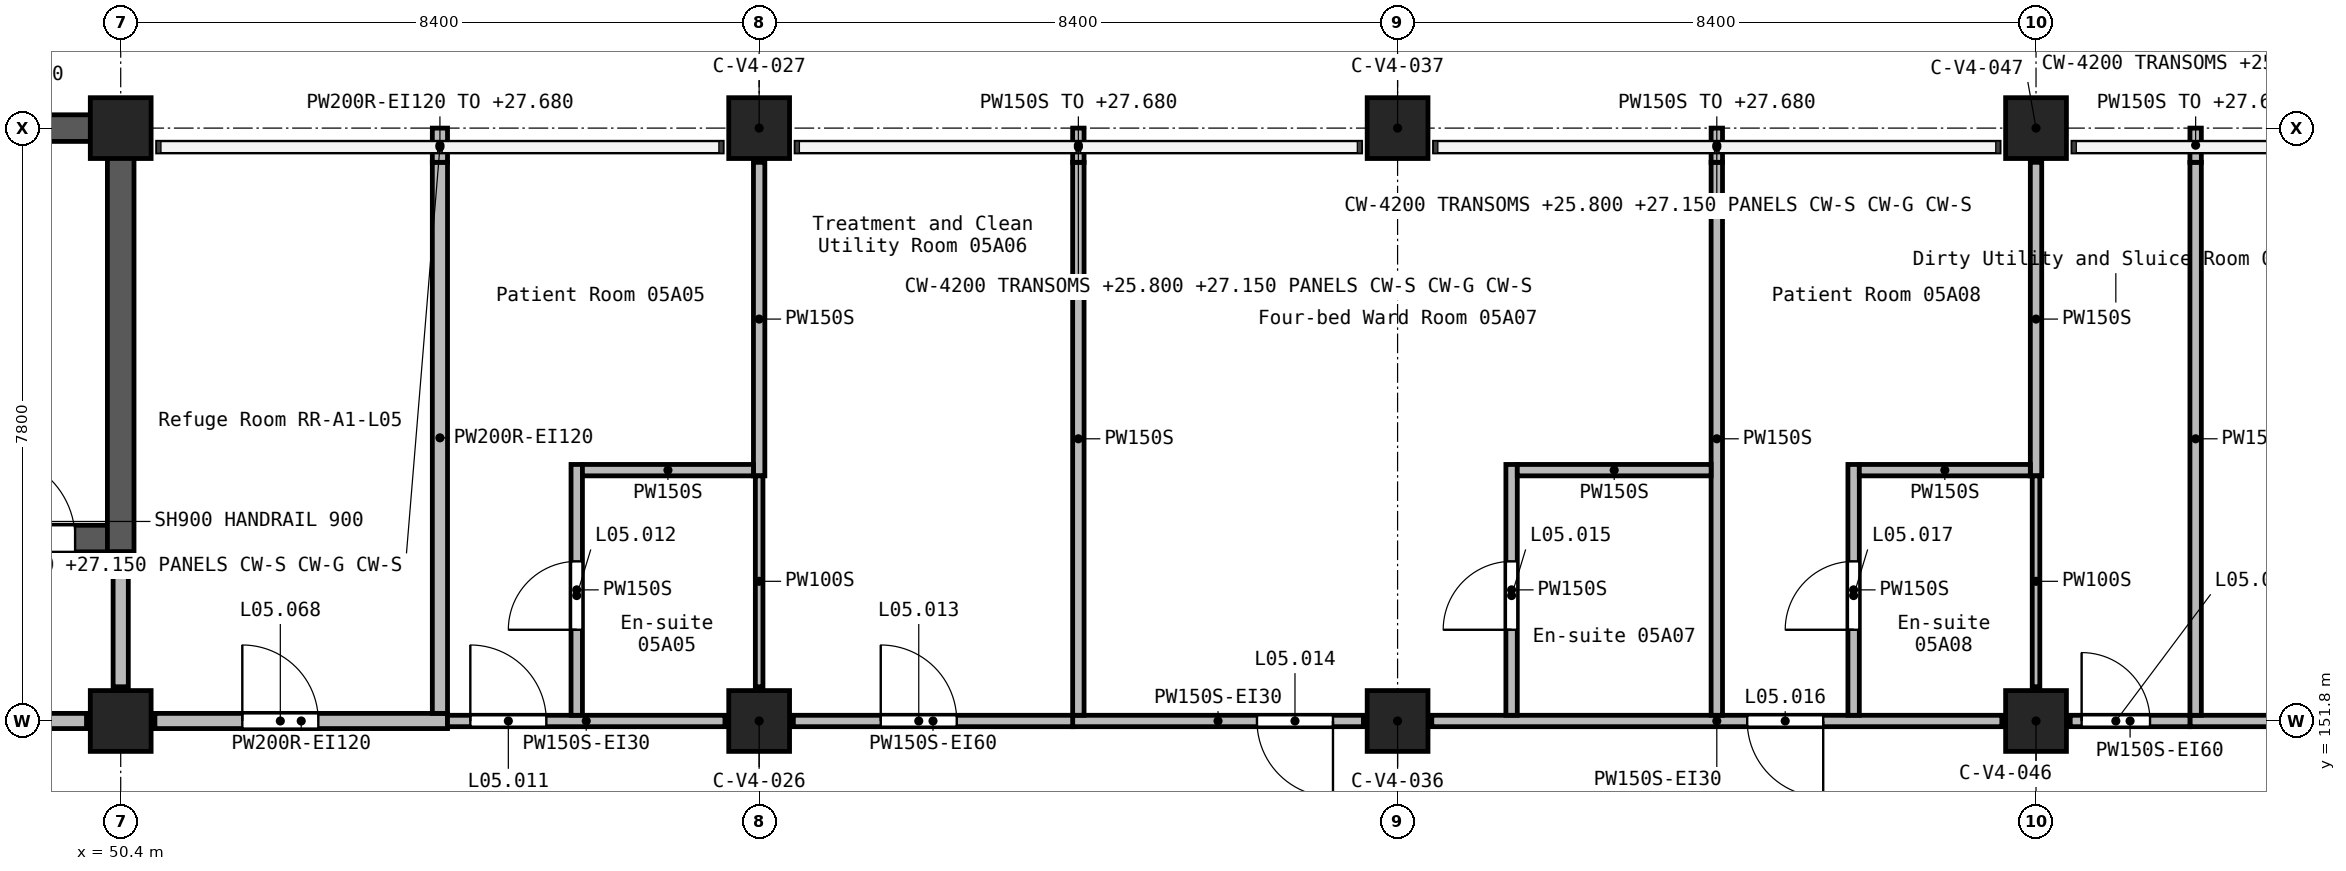
"""IFC4 building model, lengths in metres.
Left out: names, types, materials, properties, quantities, classifications, styles, units other than length and angle.
Written with IfcOpenShell. Run it as: python <this file> out.ifc"""

import sys

from ifc_helpers import new_model, si_unit, direction, frame, frame_2d, origin, origin_2d, place, context, subcontext, project, spatial, rectangle, extrude, element, fill, save


model = new_model("IFC4")
c1 = context("Model", 3, precision=1e-05, world=origin(), true_north=direction((0.0, 1.0)))
c2 = subcontext(c1, "Body", "Model", "MODEL_VIEW")
j1 = project(units=[si_unit("LENGTHUNIT", "METRE"), si_unit("PLANEANGLEUNIT", "RADIAN")], contexts=[c1])
p1 = place(None, origin())
s1 = spatial("IfcSite", under=j1, at=p1, CompositionType="ELEMENT")
p2 = place(p1, origin())
s2 = spatial("IfcBuilding", under=s1, at=p2, CompositionType="ELEMENT")
p3 = place(p2, frame((0.0, 0.0, 24.9)))
s3 = spatial("IfcBuildingStorey", under=s2, at=p3, CompositionType="ELEMENT", Elevation=24.9)
for number, where, z_axis, x_axis in (
    (1, (50.4, 151.8, 0.0), (0.0, 0.0, 1.0), (1.0, 0.0, 0.0)),
    (2, (50.4, 159.6, 0.0), (0.0, 0.0, 1.0), (1.0, 0.0, 0.0)),
    (3, (58.8, 151.8, 0.0), (0.0, 0.0, 1.0), (1.0, 0.0, 0.0)),
    (4, (58.8, 159.6, 0.0), (0.0, 0.0, 1.0), (1.0, 0.0, 0.0)),
    (5, (67.2, 151.8, 0.0), (0.0, 0.0, 1.0), (1.0, 0.0, 0.0)),
    (6, (67.2, 159.6, 0.0), (0.0, 0.0, 1.0), (1.0, 0.0, 0.0)),
    (7, (75.6, 151.8, 0.0), (0.0, 0.0, 1.0), (1.0, 0.0, 0.0)),
    (8, (75.6, 159.6, 0.0), (0.0, 0.0, 1.0), (1.0, 0.0, 0.0)),
):
    element("IfcColumn", number, at=place(p3, frame(where, z_axis=z_axis, x_axis=x_axis)), inside=s3, PredefinedType="COLUMN", context=c2, shape_type="SweptSolid", body=[
        extrude(rectangle(XDim=0.8, YDim=0.8, at=origin_2d()), origin(), (0.0, 0.0, 1.0), 3.9),
    ])
p4 = place(p3, frame((41.825, 159.6, 0.0), z_axis=(0.0, 0.0, 1.0), x_axis=(1.0, 0.0, 0.0)))
e9 = element("IfcWall", 9, at=p4, inside=s3, PredefinedType="SHEAR", context=c2, shape_type="SweptSolid", body=[
    extrude(rectangle(XDim=8.4, YDim=0.35, at=frame_2d((4.2, 0.0))), origin(), (0.0, 0.0, 1.0), 3.9),
])
p5 = place(p3, frame((42.175, 154.2, 0.0), z_axis=(0.0, 0.0, 1.0), x_axis=(1.0, 0.0, 0.0)))
e10 = element("IfcWall", 10, at=p5, inside=s3, PredefinedType="SHEAR", context=c2, shape_type="SweptSolid", body=[
    extrude(rectangle(XDim=8.05, YDim=0.35, at=frame_2d((4.025, 0.0))), origin(), (0.0, 0.0, 1.0), 3.9),
])
p6 = place(p5, frame((6.525, 0.0, 0.0)))
e11 = element("IfcOpeningElement", 11, at=p6, cuts=e10, PredefinedType="OPENING", context=c2, shape_type="SweptSolid", body=[
    extrude(rectangle(XDim=1.1, YDim=2.1, at=frame_2d((0.55, 1.05))), frame((0.0, 0.185, 0.0), z_axis=(0.0, -1.0, 0.0), x_axis=(1.0, 0.0, 0.0)), (0.0, 0.0, 1.0), 0.37),
])
p7 = place(p3, frame((50.4, 154.025, 0.0), z_axis=(0.0, 0.0, 1.0), x_axis=(0.0, 1.0, 0.0)))
e12 = element("IfcWall", 12, at=p7, inside=s3, PredefinedType="SHEAR", context=c2, shape_type="SweptSolid", body=[
    extrude(rectangle(XDim=5.75, YDim=0.35, at=frame_2d((2.875, 0.0))), origin(), (0.0, 0.0, 1.0), 3.9),
])
p8 = place(p3, frame((42.45, 151.8, 0.0), z_axis=(0.0, 0.0, 1.0), x_axis=(1.0, 0.0, 0.0)))
e13 = element("IfcWall", 13, at=p8, inside=s3, PredefinedType="SOLIDWALL", context=c2, shape_type="SweptSolid", body=[
    extrude(rectangle(XDim=7.5, YDim=0.2, at=frame_2d((3.75, 0.0))), origin(), (0.0, 0.0, 1.0), 3.6),
])
p9 = place(p8, frame((3.2, 0.0, 0.0)))
e14 = element("IfcOpeningElement", 14, at=p9, cuts=e13, PredefinedType="OPENING", context=c2, shape_type="SweptSolid", body=[
    extrude(rectangle(XDim=1.1, YDim=2.1, at=frame_2d((0.55, 1.05))), frame((0.0, 0.11, 0.0), z_axis=(0.0, -1.0, 0.0), x_axis=(1.0, 0.0, 0.0)), (0.0, 0.0, 1.0), 0.22),
])
p10 = place(p3, frame((50.85, 151.8, 0.0), z_axis=(0.0, 0.0, 1.0), x_axis=(1.0, 0.0, 0.0)))
e15 = element("IfcWall", 15, at=p10, inside=s3, PredefinedType="SOLIDWALL", context=c2, shape_type="SweptSolid", body=[
    extrude(rectangle(XDim=3.85, YDim=0.2, at=frame_2d((1.925, 0.0))), origin(), (0.0, 0.0, 1.0), 3.6),
])
p11 = place(p10, frame((1.15, 0.0, 0.0)))
e16 = element("IfcOpeningElement", 16, at=p11, cuts=e15, PredefinedType="OPENING", context=c2, shape_type="SweptSolid", body=[
    extrude(rectangle(XDim=1.0, YDim=2.1, at=frame_2d((0.5, 1.05))), frame((0.0, 0.11, 0.0), z_axis=(0.0, -1.0, 0.0), x_axis=(1.0, 0.0, 0.0)), (0.0, 0.0, 1.0), 0.22),
])
p12 = place(p3, frame((50.4, 152.25, 0.0), z_axis=(0.0, 0.0, 1.0), x_axis=(0.0, 1.0, 0.0)))
e17 = element("IfcWall", 17, at=p12, inside=s3, PredefinedType="SOLIDWALL", context=c2, shape_type="SweptSolid", body=[
    extrude(rectangle(XDim=1.775, YDim=0.2, at=frame_2d((0.887, 0.0))), origin(), (0.0, 0.0, 1.0), 3.6),
])
p13 = place(p3, frame((54.6, 151.9, 0.0), z_axis=(0.0, 0.0, 1.0), x_axis=(0.0, 1.0, 0.0)))
e18 = element("IfcWall", 18, at=p13, inside=s3, PredefinedType="SOLIDWALL", context=c2, shape_type="SweptSolid", body=[
    extrude(rectangle(XDim=7.25, YDim=0.2, at=frame_2d((3.625, 0.0))), origin(), (0.0, 0.0, 1.0), 3.6),
])
p14 = place(p3, frame((54.6, 159.15, 0.0), z_axis=(0.0, 0.0, 1.0), x_axis=(0.0, 1.0, 0.0)))
e19 = element("IfcWall", 19, at=p14, inside=s3, PredefinedType="SOLIDWALL", context=c2, shape_type="SweptSolid", body=[
    extrude(rectangle(XDim=0.45, YDim=0.2, at=frame_2d((0.225, 0.0))), origin(), (0.0, 0.0, 1.0), 2.78),
])
p15 = place(p3, frame((75.15, 151.8, 0.0), z_axis=(0.0, 0.0, 1.0), x_axis=(-1.0, 0.0, 0.0)))
e20 = element("IfcWall", 20, at=p15, inside=s3, PredefinedType="PARTITIONING", context=c2, shape_type="SweptSolid", body=[
    extrude(rectangle(XDim=7.5, YDim=0.15, at=frame_2d((3.75, 0.0))), origin(), (0.0, 0.0, 1.0), 3.6),
])
p16 = place(p15, frame((2.35, 0.0, 0.0)))
e21 = element("IfcOpeningElement", 21, at=p16, cuts=e20, PredefinedType="OPENING", context=c2, shape_type="SweptSolid", body=[
    extrude(rectangle(XDim=1.0, YDim=2.1, at=frame_2d((0.5, 1.05))), frame((0.0, 0.085, 0.0), z_axis=(0.0, -1.0, 0.0), x_axis=(1.0, 0.0, 0.0)), (0.0, 0.0, 1.0), 0.17),
])
p17 = place(p3, frame((66.75, 151.8, 0.0), z_axis=(0.0, 0.0, 1.0), x_axis=(-1.0, 0.0, 0.0)))
e22 = element("IfcWall", 22, at=p17, inside=s3, PredefinedType="PARTITIONING", context=c2, shape_type="SweptSolid", body=[
    extrude(rectangle(XDim=3.825, YDim=0.15, at=frame_2d((1.913, 0.0))), origin(), (0.0, 0.0, 1.0), 3.6),
])
p18 = place(p17, frame((0.4, 0.0, 0.0)))
e23 = element("IfcOpeningElement", 23, at=p18, cuts=e22, PredefinedType="OPENING", context=c2, shape_type="SweptSolid", body=[
    extrude(rectangle(XDim=1.0, YDim=2.1, at=frame_2d((0.5, 1.05))), frame((0.0, 0.085, 0.0), z_axis=(0.0, -1.0, 0.0), x_axis=(1.0, 0.0, 0.0)), (0.0, 0.0, 1.0), 0.17),
])
p19 = place(p3, frame((77.625, 151.8, 0.0), z_axis=(0.0, 0.0, 1.0), x_axis=(1.0, 0.0, 0.0)))
e24 = element("IfcWall", 24, at=p19, inside=s3, PredefinedType="PARTITIONING", context=c2, shape_type="SweptSolid", body=[
    extrude(rectangle(XDim=5.925, YDim=0.15, at=frame_2d((2.962, 0.0))), origin(), (0.0, 0.0, 1.0), 3.6),
])
p20 = place(p19, frame((1.375, 0.0, 0.0)))
e25 = element("IfcOpeningElement", 25, at=p20, cuts=e24, PredefinedType="OPENING", context=c2, shape_type="SweptSolid", body=[
    extrude(rectangle(XDim=1.0, YDim=2.1, at=frame_2d((0.5, 1.05))), frame((0.0, 0.085, 0.0), z_axis=(0.0, -1.0, 0.0), x_axis=(1.0, 0.0, 0.0)), (0.0, 0.0, 1.0), 0.17),
])
p21 = place(p3, frame((59.25, 151.8, 0.0), z_axis=(0.0, 0.0, 1.0), x_axis=(1.0, 0.0, 0.0)))
e26 = element("IfcWall", 26, at=p21, inside=s3, PredefinedType="PARTITIONING", context=c2, shape_type="SweptSolid", body=[
    extrude(rectangle(XDim=3.675, YDim=0.15, at=frame_2d((1.837, 0.0))), origin(), (0.0, 0.0, 1.0), 3.6),
])
p22 = place(p21, frame((1.15, 0.0, 0.0)))
e27 = element("IfcOpeningElement", 27, at=p22, cuts=e26, PredefinedType="OPENING", context=c2, shape_type="SweptSolid", body=[
    extrude(rectangle(XDim=1.0, YDim=2.1, at=frame_2d((0.5, 1.05))), frame((0.0, 0.085, 0.0), z_axis=(0.0, -1.0, 0.0), x_axis=(1.0, 0.0, 0.0)), (0.0, 0.0, 1.0), 0.17),
])
p23 = place(p3, frame((54.7, 151.8, 0.0), z_axis=(0.0, 0.0, 1.0), x_axis=(1.0, 0.0, 0.0)))
e28 = element("IfcWall", 28, at=p23, inside=s3, PredefinedType="PARTITIONING", context=c2, shape_type="SweptSolid", body=[
    extrude(rectangle(XDim=3.65, YDim=0.15, at=frame_2d((1.825, 0.0))), origin(), (0.0, 0.0, 1.0), 3.6),
])
p24 = place(p23, frame((0.3, 0.0, 0.0)))
e29 = element("IfcOpeningElement", 29, at=p24, cuts=e28, PredefinedType="OPENING", context=c2, shape_type="SweptSolid", body=[
    extrude(rectangle(XDim=1.0, YDim=2.1, at=frame_2d((0.5, 1.05))), frame((0.0, 0.085, 0.0), z_axis=(0.0, -1.0, 0.0), x_axis=(1.0, 0.0, 0.0)), (0.0, 0.0, 1.0), 0.17),
])
p25 = place(p3, frame((76.05, 151.8, 0.0), z_axis=(0.0, 0.0, 1.0), x_axis=(1.0, 0.0, 0.0)))
e30 = element("IfcWall", 30, at=p25, inside=s3, PredefinedType="PARTITIONING", context=c2, shape_type="SweptSolid", body=[
    extrude(rectangle(XDim=1.575, YDim=0.15, at=frame_2d((0.788, 0.0))), origin(), (0.0, 0.0, 1.0), 3.6),
])
p26 = place(p25, frame((0.15, 0.0, 0.0)))
e31 = element("IfcOpeningElement", 31, at=p26, cuts=e30, PredefinedType="OPENING", context=c2, shape_type="SweptSolid", body=[
    extrude(rectangle(XDim=0.9, YDim=2.1, at=frame_2d((0.45, 1.05))), frame((0.0, 0.085, 0.0), z_axis=(0.0, -1.0, 0.0), x_axis=(1.0, 0.0, 0.0)), (0.0, 0.0, 1.0), 0.17),
])
p27 = place(p3, frame((63.0, 151.875, 0.0), z_axis=(0.0, 0.0, 1.0), x_axis=(0.0, 1.0, 0.0)))
e32 = element("IfcWall", 32, at=p27, inside=s3, PredefinedType="PARTITIONING", context=c2, shape_type="SweptSolid", body=[
    extrude(rectangle(XDim=7.275, YDim=0.15, at=frame_2d((3.637, 0.0))), origin(), (0.0, 0.0, 1.0), 3.6),
])
p28 = place(p3, frame((63.0, 159.15, 0.0), z_axis=(0.0, 0.0, 1.0), x_axis=(0.0, 1.0, 0.0)))
e33 = element("IfcWall", 33, at=p28, inside=s3, PredefinedType="PARTITIONING", context=c2, shape_type="SweptSolid", body=[
    extrude(rectangle(XDim=0.45, YDim=0.15, at=frame_2d((0.225, 0.0))), origin(), (0.0, 0.0, 1.0), 2.78),
])
p29 = place(p3, frame((71.4, 151.875, 0.0), z_axis=(0.0, 0.0, 1.0), x_axis=(0.0, 1.0, 0.0)))
e34 = element("IfcWall", 34, at=p29, inside=s3, PredefinedType="PARTITIONING", context=c2, shape_type="SweptSolid", body=[
    extrude(rectangle(XDim=7.275, YDim=0.15, at=frame_2d((3.637, 0.0))), origin(), (0.0, 0.0, 1.0), 3.6),
])
p30 = place(p3, frame((71.4, 159.15, 0.0), z_axis=(0.0, 0.0, 1.0), x_axis=(0.0, 1.0, 0.0)))
e35 = element("IfcWall", 35, at=p30, inside=s3, PredefinedType="PARTITIONING", context=c2, shape_type="SweptSolid", body=[
    extrude(rectangle(XDim=0.45, YDim=0.15, at=frame_2d((0.225, 0.0))), origin(), (0.0, 0.0, 1.0), 2.78),
])
p31 = place(p3, frame((77.7, 151.875, 0.0), z_axis=(0.0, 0.0, 1.0), x_axis=(0.0, 1.0, 0.0)))
e36 = element("IfcWall", 36, at=p31, inside=s3, PredefinedType="PARTITIONING", context=c2, shape_type="SweptSolid", body=[
    extrude(rectangle(XDim=7.275, YDim=0.15, at=frame_2d((3.637, 0.0))), origin(), (0.0, 0.0, 1.0), 3.6),
])
p32 = place(p3, frame((77.7, 159.15, 0.0), z_axis=(0.0, 0.0, 1.0), x_axis=(0.0, 1.0, 0.0)))
e37 = element("IfcWall", 37, at=p32, inside=s3, PredefinedType="PARTITIONING", context=c2, shape_type="SweptSolid", body=[
    extrude(rectangle(XDim=0.45, YDim=0.15, at=frame_2d((0.225, 0.0))), origin(), (0.0, 0.0, 1.0), 2.78),
])
for number, where, z_axis, x_axis in (
    (38, (58.8, 155.025, 0.0), (0.0, 0.0, 1.0), (0.0, 1.0, 0.0)),
    (39, (75.6, 155.025, 0.0), (0.0, 0.0, 1.0), (0.0, 1.0, 0.0)),
):
    element("IfcWall", number, at=place(p3, frame(where, z_axis=z_axis, x_axis=x_axis)), inside=s3, PredefinedType="PARTITIONING", context=c2, shape_type="SweptSolid", body=[
        extrude(rectangle(XDim=4.125, YDim=0.15, at=frame_2d((2.062, 0.0))), origin(), (0.0, 0.0, 1.0), 3.6),
    ])
p33 = place(p3, frame((56.4, 151.875, 0.0), z_axis=(0.0, 0.0, 1.0), x_axis=(0.0, 1.0, 0.0)))
e40 = element("IfcWall", 40, at=p33, inside=s3, PredefinedType="PARTITIONING", context=c2, shape_type="SweptSolid", body=[
    extrude(rectangle(XDim=3.3, YDim=0.15, at=frame_2d((1.65, 0.0))), origin(), (0.0, 0.0, 1.0), 3.6),
])
p34 = place(p33, frame((1.125, 0.0, 0.0)))
e41 = element("IfcOpeningElement", 41, at=p34, cuts=e40, PredefinedType="OPENING", context=c2, shape_type="SweptSolid", body=[
    extrude(rectangle(XDim=0.9, YDim=2.1, at=frame_2d((0.45, 1.05))), frame((0.0, 0.085, 0.0), z_axis=(0.0, -1.0, 0.0), x_axis=(1.0, 0.0, 0.0)), (0.0, 0.0, 1.0), 0.17),
])
p35 = place(p3, frame((68.7, 151.875, 0.0), z_axis=(0.0, 0.0, 1.0), x_axis=(0.0, 1.0, 0.0)))
e42 = element("IfcWall", 42, at=p35, inside=s3, PredefinedType="PARTITIONING", context=c2, shape_type="SweptSolid", body=[
    extrude(rectangle(XDim=3.3, YDim=0.15, at=frame_2d((1.65, 0.0))), origin(), (0.0, 0.0, 1.0), 3.6),
])
p36 = place(p35, frame((1.125, 0.0, 0.0)))
e43 = element("IfcOpeningElement", 43, at=p36, cuts=e42, PredefinedType="OPENING", context=c2, shape_type="SweptSolid", body=[
    extrude(rectangle(XDim=0.9, YDim=2.1, at=frame_2d((0.45, 1.05))), frame((0.0, 0.085, 0.0), z_axis=(0.0, -1.0, 0.0), x_axis=(1.0, 0.0, 0.0)), (0.0, 0.0, 1.0), 0.17),
])
p37 = place(p3, frame((73.2, 151.875, 0.0), z_axis=(0.0, 0.0, 1.0), x_axis=(0.0, 1.0, 0.0)))
e44 = element("IfcWall", 44, at=p37, inside=s3, PredefinedType="PARTITIONING", context=c2, shape_type="SweptSolid", body=[
    extrude(rectangle(XDim=3.3, YDim=0.15, at=frame_2d((1.65, 0.0))), origin(), (0.0, 0.0, 1.0), 3.6),
])
p38 = place(p37, frame((1.125, 0.0, 0.0)))
e45 = element("IfcOpeningElement", 45, at=p38, cuts=e44, PredefinedType="OPENING", context=c2, shape_type="SweptSolid", body=[
    extrude(rectangle(XDim=0.9, YDim=2.1, at=frame_2d((0.45, 1.05))), frame((0.0, 0.085, 0.0), z_axis=(0.0, -1.0, 0.0), x_axis=(1.0, 0.0, 0.0)), (0.0, 0.0, 1.0), 0.17),
])
p39 = place(p3, frame((68.775, 155.1, 0.0), z_axis=(0.0, 0.0, 1.0), x_axis=(1.0, 0.0, 0.0)))
e46 = element("IfcWall", 46, at=p39, inside=s3, PredefinedType="PARTITIONING", context=c2, shape_type="SweptSolid", body=[
    extrude(rectangle(XDim=2.55, YDim=0.15, at=frame_2d((1.275, 0.0))), origin(), (0.0, 0.0, 1.0), 3.6),
])
for number, where, z_axis, x_axis in (
    (47, (56.475, 155.1, 0.0), (0.0, 0.0, 1.0), (1.0, 0.0, 0.0)),
    (48, (73.275, 155.1, 0.0), (0.0, 0.0, 1.0), (1.0, 0.0, 0.0)),
):
    element("IfcWall", number, at=place(p3, frame(where, z_axis=z_axis, x_axis=x_axis)), inside=s3, PredefinedType="PARTITIONING", context=c2, shape_type="SweptSolid", body=[
        extrude(rectangle(XDim=2.25, YDim=0.15, at=frame_2d((1.125, 0.0))), origin(), (0.0, 0.0, 1.0), 3.6),
    ])
for number, where, z_axis, x_axis in (
    (49, (58.8, 152.25, 0.0), (0.0, 0.0, 1.0), (0.0, 1.0, 0.0)),
    (50, (75.6, 152.25, 0.0), (0.0, 0.0, 1.0), (0.0, 1.0, 0.0)),
):
    element("IfcWall", number, at=place(p3, frame(where, z_axis=z_axis, x_axis=x_axis)), inside=s3, PredefinedType="PARTITIONING", context=c2, shape_type="SweptSolid", body=[
        extrude(rectangle(XDim=2.775, YDim=0.1, at=frame_2d((1.387, 0.0))), origin(), (0.0, 0.0, 1.0), 3.6),
    ])
p40 = place(p24, origin())
e51 = element("IfcDoor", 51, at=p40, inside=s3, OperationType="SINGLE_SWING_LEFT", PredefinedType="DOOR", context=c2, shape_type="SweptSolid", body=[
    extrude(rectangle(XDim=1.0, YDim=2.1, at=frame_2d((0.5, 1.05))), frame((0.0, 0.025, 0.0), z_axis=(0.0, -1.0, 0.0), x_axis=(1.0, 0.0, 0.0)), (0.0, 0.0, 1.0), 0.05),
])
fill(e29, e51)
p41 = place(p34, frame((0.9, 0.0, 0.0), z_axis=(0.0, 0.0, 1.0), x_axis=(-1.0, 0.0, 0.0)))
e52 = element("IfcDoor", 52, at=p41, inside=s3, OperationType="SINGLE_SWING_RIGHT", PredefinedType="DOOR", context=c2, shape_type="SweptSolid", body=[
    extrude(rectangle(XDim=0.9, YDim=2.1, at=frame_2d((0.45, 1.05))), frame((0.0, 0.025, 0.0), z_axis=(0.0, -1.0, 0.0), x_axis=(1.0, 0.0, 0.0)), (0.0, 0.0, 1.0), 0.05),
])
fill(e41, e52)
p42 = place(p22, origin())
e53 = element("IfcDoor", 53, at=p42, inside=s3, OperationType="SINGLE_SWING_LEFT", PredefinedType="DOOR", context=c2, shape_type="SweptSolid", body=[
    extrude(rectangle(XDim=1.0, YDim=2.1, at=frame_2d((0.5, 1.05))), frame((0.0, 0.025, 0.0), z_axis=(0.0, -1.0, 0.0), x_axis=(1.0, 0.0, 0.0)), (0.0, 0.0, 1.0), 0.05),
])
fill(e27, e53)
p43 = place(p18, frame((1.0, 0.0, 0.0), z_axis=(0.0, 0.0, 1.0), x_axis=(-1.0, 0.0, 0.0)))
e54 = element("IfcDoor", 54, at=p43, inside=s3, OperationType="SINGLE_SWING_RIGHT", PredefinedType="DOOR", context=c2, shape_type="SweptSolid", body=[
    extrude(rectangle(XDim=1.0, YDim=2.1, at=frame_2d((0.5, 1.05))), frame((0.0, 0.025, 0.0), z_axis=(0.0, -1.0, 0.0), x_axis=(1.0, 0.0, 0.0)), (0.0, 0.0, 1.0), 0.05),
])
fill(e23, e54)
p44 = place(p36, frame((0.9, 0.0, 0.0), z_axis=(0.0, 0.0, 1.0), x_axis=(-1.0, 0.0, 0.0)))
e55 = element("IfcDoor", 55, at=p44, inside=s3, OperationType="SINGLE_SWING_RIGHT", PredefinedType="DOOR", context=c2, shape_type="SweptSolid", body=[
    extrude(rectangle(XDim=0.9, YDim=2.1, at=frame_2d((0.45, 1.05))), frame((0.0, 0.025, 0.0), z_axis=(0.0, -1.0, 0.0), x_axis=(1.0, 0.0, 0.0)), (0.0, 0.0, 1.0), 0.05),
])
fill(e43, e55)
p45 = place(p16, frame((1.0, 0.0, 0.0), z_axis=(0.0, 0.0, 1.0), x_axis=(-1.0, 0.0, 0.0)))
e56 = element("IfcDoor", 56, at=p45, inside=s3, OperationType="SINGLE_SWING_RIGHT", PredefinedType="DOOR", context=c2, shape_type="SweptSolid", body=[
    extrude(rectangle(XDim=1.0, YDim=2.1, at=frame_2d((0.5, 1.05))), frame((0.0, 0.025, 0.0), z_axis=(0.0, -1.0, 0.0), x_axis=(1.0, 0.0, 0.0)), (0.0, 0.0, 1.0), 0.05),
])
fill(e21, e56)
p46 = place(p38, frame((0.9, 0.0, 0.0), z_axis=(0.0, 0.0, 1.0), x_axis=(-1.0, 0.0, 0.0)))
e57 = element("IfcDoor", 57, at=p46, inside=s3, OperationType="SINGLE_SWING_RIGHT", PredefinedType="DOOR", context=c2, shape_type="SweptSolid", body=[
    extrude(rectangle(XDim=0.9, YDim=2.1, at=frame_2d((0.45, 1.05))), frame((0.0, 0.025, 0.0), z_axis=(0.0, -1.0, 0.0), x_axis=(1.0, 0.0, 0.0)), (0.0, 0.0, 1.0), 0.05),
])
fill(e45, e57)
p47 = place(p26, origin())
e58 = element("IfcDoor", 58, at=p47, inside=s3, OperationType="SINGLE_SWING_LEFT", PredefinedType="DOOR", context=c2, shape_type="SweptSolid", body=[
    extrude(rectangle(XDim=0.9, YDim=2.1, at=frame_2d((0.45, 1.05))), frame((0.0, 0.025, 0.0), z_axis=(0.0, -1.0, 0.0), x_axis=(1.0, 0.0, 0.0)), (0.0, 0.0, 1.0), 0.05),
])
fill(e31, e58)
p48 = place(p11, origin())
e59 = element("IfcDoor", 59, at=p48, inside=s3, OperationType="SINGLE_SWING_LEFT", PredefinedType="DOOR", context=c2, shape_type="SweptSolid", body=[
    extrude(rectangle(XDim=1.0, YDim=2.1, at=frame_2d((0.5, 1.05))), frame((0.0, 0.025, 0.0), z_axis=(0.0, -1.0, 0.0), x_axis=(1.0, 0.0, 0.0)), (0.0, 0.0, 1.0), 0.05),
])
fill(e16, e59)
p49 = place(p6, origin())
e60 = element("IfcDoor", 60, at=p49, inside=s3, OperationType="SINGLE_SWING_RIGHT", PredefinedType="DOOR", context=c2, shape_type="SweptSolid", body=[
    extrude(rectangle(XDim=1.1, YDim=2.1, at=frame_2d((0.55, 1.05))), frame((0.0, 0.025, 0.0), z_axis=(0.0, -1.0, 0.0), x_axis=(1.0, 0.0, 0.0)), (0.0, 0.0, 1.0), 0.05),
])
fill(e11, e60)
save(model, sys.argv[1])
